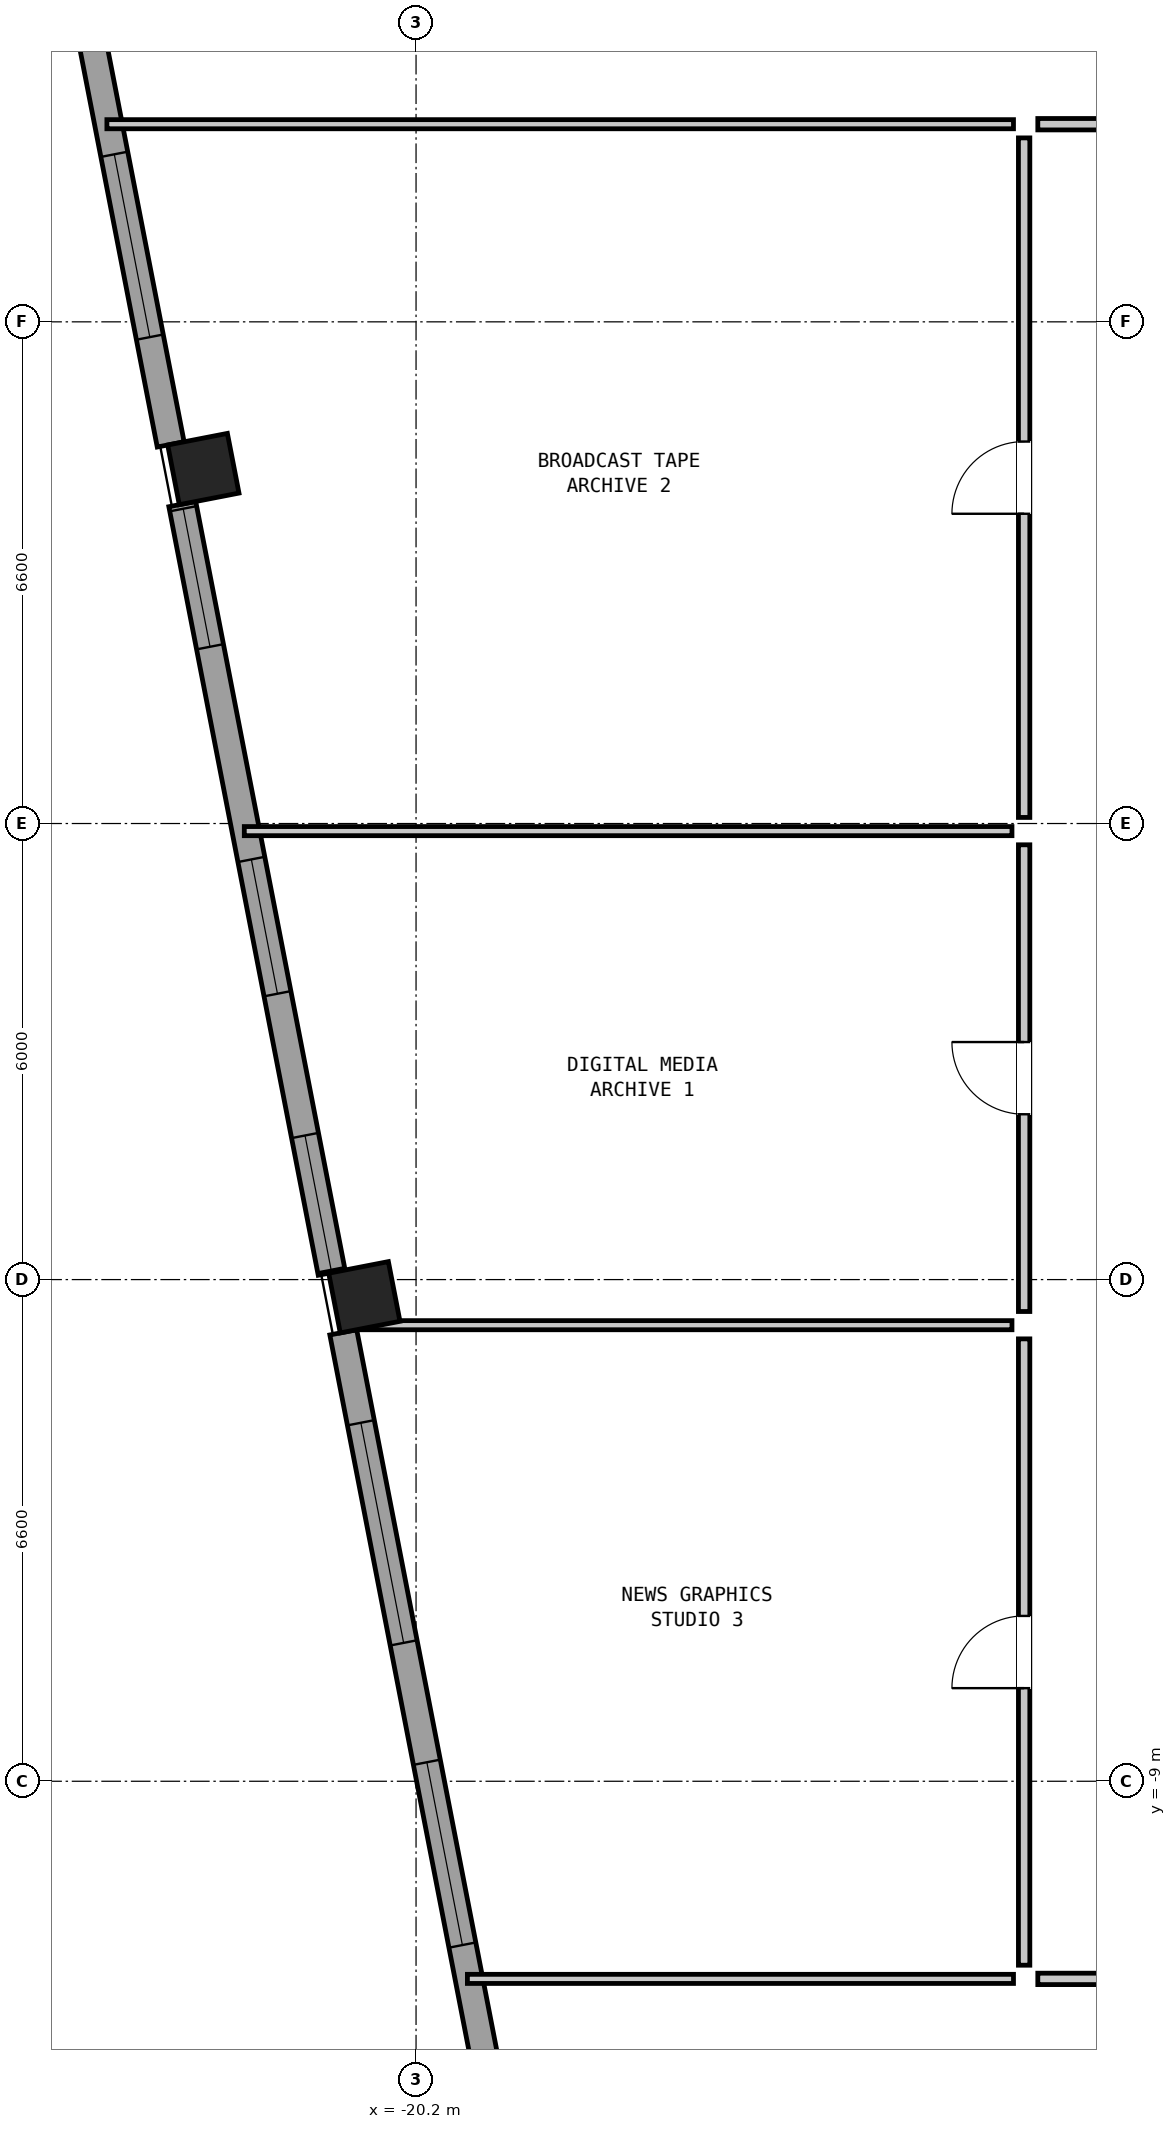
"""IFC4 building model, lengths in metres.
Left out: names, types, materials, properties, quantities, classifications, styles, units other than length and angle.
Written with IfcOpenShell. Run it as: python <this file> out.ifc"""

import sys

from ifc_helpers import new_model, si_unit, direction, frame, frame_2d, origin, origin_2d, place, context, subcontext, project, spatial, rectangle, hollow_rectangle, extrude, element, fill, save


model = new_model("IFC4")
c1 = context("Model", 3, precision=1e-05, world=origin(), true_north=direction((0.0, 1.0)))
c2 = subcontext(c1, "Body", "Model", "MODEL_VIEW")
j1 = project(units=[si_unit("LENGTHUNIT", "METRE"), si_unit("PLANEANGLEUNIT", "RADIAN")], contexts=[c1])
p1 = place(None, origin())
s1 = spatial("IfcSite", under=j1, at=p1, CompositionType="ELEMENT")
p2 = place(p1, origin())
s2 = spatial("IfcBuilding", under=s1, at=p2, CompositionType="ELEMENT")
p3 = place(p2, frame((0.0, 0.0, 134.15)))
s3 = spatial("IfcBuildingStorey", under=s2, at=p3, CompositionType="ELEMENT", Elevation=134.15)
for number, where, z_axis, x_axis in (
    (1, (-22.998, 8.263, 0.0), (0.0, 0.0, 1.0), (-0.191, 0.982, 0.0)),
    (2, (-20.88, -2.633, 0.0), (0.0, 0.0, 1.0), (-0.191, 0.982, 0.0)),
):
    element("IfcColumn", number, at=place(p3, frame(where, z_axis=z_axis, x_axis=x_axis)), inside=s3, PredefinedType="COLUMN", context=c2, shape_type="SweptSolid", body=[
        extrude(hollow_rectangle(XDim=0.8, YDim=0.8, WallThickness=0.05, at=origin_2d()), origin(), (0.0, 0.0, 1.0), 3.05),
    ])
p4 = place(p3, frame((-19.19, -13.217, 0.0), z_axis=(0.0, 0.0, 1.0), x_axis=(-0.190822765986, 0.981624506612, 0.0)))
e3 = element("IfcWall", 3, at=p4, inside=s3, PredefinedType="SOLIDWALL", context=c2, shape_type="SweptSolid", body=[
    extrude(rectangle(XDim=10.312, YDim=0.36, at=frame_2d((5.156, 0.0))), origin(), (0.0, 0.0, 1.0), 2.067),
])
p5 = place(p4, frame((2.1, 0.0, 0.2)))
e4 = element("IfcOpeningElement", 4, at=p5, cuts=e3, PredefinedType="OPENING", context=c2, shape_type="SweptSolid", body=[
    extrude(rectangle(XDim=2.45, YDim=1.1, at=frame_2d((1.225, 0.55))), frame((0.0, 0.192, 0.0), z_axis=(0.0, -1.0, 0.0), x_axis=(1.0, 0.0, 0.0)), (0.0, 0.0, 1.0), 0.384),
])
p6 = place(p4, frame((6.15, 0.0, 0.95)))
e5 = element("IfcOpeningElement", 5, at=p6, cuts=e3, PredefinedType="OPENING", context=c2, shape_type="SweptSolid", body=[
    extrude(rectangle(XDim=2.95, YDim=0.95, at=frame_2d((1.475, 0.475))), frame((0.0, 0.192, 0.0), z_axis=(0.0, -1.0, 0.0), x_axis=(1.0, 0.0, 0.0)), (0.0, 0.0, 1.0), 0.384),
])
p7 = place(p3, frame((-21.31, -2.309, 0.0), z_axis=(0.0, 0.0, 1.0), x_axis=(-0.190811924826, 0.981626614016, 0.0)))
e6 = element("IfcWall", 6, at=p7, inside=s3, PredefinedType="SOLIDWALL", context=c2, shape_type="SweptSolid", body=[
    extrude(rectangle(XDim=10.3, YDim=0.36, at=frame_2d((5.15, 0.0))), origin(), (0.0, 0.0, 1.0), 2.067),
])
p8 = place(p7, frame((0.038, 0.0, 0.2)))
e7 = element("IfcOpeningElement", 7, at=p8, cuts=e6, PredefinedType="OPENING", context=c2, shape_type="SweptSolid", body=[
    extrude(rectangle(XDim=1.8, YDim=1.25, at=frame_2d((0.9, 0.625))), frame((0.0, 0.192, 0.0), z_axis=(0.0, -1.0, 0.0), x_axis=(1.0, 0.0, 0.0)), (0.0, 0.0, 1.0), 0.384),
])
p9 = place(p7, frame((3.738, 0.0, 0.9)))
e8 = element("IfcOpeningElement", 8, at=p9, cuts=e6, PredefinedType="OPENING", context=c2, shape_type="SweptSolid", body=[
    extrude(rectangle(XDim=1.8, YDim=1.0, at=frame_2d((0.9, 0.5))), frame((0.0, 0.192, 0.0), z_axis=(0.0, -1.0, 0.0), x_axis=(1.0, 0.0, 0.0)), (0.0, 0.0, 1.0), 0.384),
])
p10 = place(p7, frame((8.388, 0.0, 0.2)))
e9 = element("IfcOpeningElement", 9, at=p10, cuts=e6, PredefinedType="OPENING", context=c2, shape_type="SweptSolid", body=[
    extrude(rectangle(XDim=1.85, YDim=1.2, at=frame_2d((0.925, 0.6))), frame((0.0, 0.192, 0.0), z_axis=(0.0, -1.0, 0.0), x_axis=(1.0, 0.0, 0.0)), (0.0, 0.0, 1.0), 0.384),
])
p11 = place(p3, frame((-23.428, 8.587, 0.0), z_axis=(0.0, 0.0, 1.0), x_axis=(-0.190822765986, 0.981624506612, 0.0)))
e10 = element("IfcWall", 10, at=p11, inside=s3, PredefinedType="SOLIDWALL", context=c2, shape_type="SweptSolid", body=[
    extrude(rectangle(XDim=10.312, YDim=0.36, at=frame_2d((5.156, 0.0))), origin(), (0.0, 0.0, 1.0), 2.067),
])
p12 = place(p11, frame((1.438, 0.0, 0.8)))
e11 = element("IfcOpeningElement", 11, at=p12, cuts=e10, PredefinedType="OPENING", context=c2, shape_type="SweptSolid", body=[
    extrude(rectangle(XDim=2.45, YDim=1.1, at=frame_2d((1.225, 0.55))), frame((0.0, 0.192, 0.0), z_axis=(0.0, -1.0, 0.0), x_axis=(1.0, 0.0, 0.0)), (0.0, 0.0, 1.0), 0.384),
])
p13 = place(p11, frame((5.438, 0.0, 0.2)))
e12 = element("IfcOpeningElement", 12, at=p13, cuts=e10, PredefinedType="OPENING", context=c2, shape_type="SweptSolid", body=[
    extrude(rectangle(XDim=3.1, YDim=0.9, at=frame_2d((1.55, 0.45))), frame((0.0, 0.192, 0.0), z_axis=(0.0, -1.0, 0.0), x_axis=(1.0, 0.0, 0.0)), (0.0, 0.0, 1.0), 0.384),
])
p14 = place(p3, frame((-24.267, 12.8, 0.0), z_axis=(0.0, 0.0, 1.0), x_axis=(1.0, 0.0, 0.0)))
e13 = element("IfcWall", 13, at=p14, inside=s3, PredefinedType="PARTITIONING", context=c2, shape_type="SweptSolid", body=[
    extrude(rectangle(XDim=11.927, YDim=0.12, at=frame_2d((5.964, 0.0))), origin(), (0.0, 0.0, 1.0), 2.83),
])
p15 = place(p3, frame((-19.524, -11.6, 0.0), z_axis=(0.0, 0.0, 1.0), x_axis=(1.0, 0.0, 0.0)))
e14 = element("IfcWall", 14, at=p15, inside=s3, PredefinedType="PARTITIONING", context=c2, shape_type="SweptSolid", body=[
    extrude(rectangle(XDim=7.184, YDim=0.12, at=frame_2d((3.592, 0.0))), origin(), (0.0, 0.0, 1.0), 2.347),
])
p16 = place(p3, frame((-21.196, -3.0, 0.0), z_axis=(0.0, 0.0, 1.0), x_axis=(1.0, 0.0, 0.0)))
e15 = element("IfcWall", 15, at=p16, inside=s3, PredefinedType="PARTITIONING", context=c2, shape_type="SweptSolid", body=[
    extrude(rectangle(XDim=8.836, YDim=0.12, at=frame_2d((4.418, 0.0))), origin(), (0.0, 0.0, 1.0), 1.883),
])
p17 = place(p3, frame((-22.459, 3.5, 0.0), z_axis=(0.0, 0.0, 1.0), x_axis=(1.0, 0.0, 0.0)))
e16 = element("IfcWall", 16, at=p17, inside=s3, PredefinedType="PARTITIONING", context=c2, shape_type="SweptSolid", body=[
    extrude(rectangle(XDim=10.099, YDim=0.12, at=frame_2d((5.05, 0.0))), origin(), (0.0, 0.0, 1.0), 1.883),
])
p18 = place(p3, frame((-12.02, 12.8, 0.0), z_axis=(0.0, 0.0, 1.0), x_axis=(1.0, 0.0, 0.0)))
e17 = element("IfcWall", 17, at=p18, inside=s3, PredefinedType="PARTITIONING", context=c2, shape_type="SweptSolid", body=[
    extrude(rectangle(XDim=5.34, YDim=0.15, at=frame_2d((2.67, 0.0))), origin(), (0.0, 0.0, 1.0), 2.83),
])
p19 = place(p18, frame((2.995, 0.0, 0.0)))
e18 = element("IfcOpeningElement", 18, at=p19, cuts=e17, PredefinedType="OPENING", context=c2, shape_type="SweptSolid", body=[
    extrude(rectangle(XDim=0.95, YDim=2.1, at=frame_2d((0.475, 1.05))), frame((0.0, 0.087, 0.0), z_axis=(0.0, -1.0, 0.0), x_axis=(1.0, 0.0, 0.0)), (0.0, 0.0, 1.0), 0.174),
])
p20 = place(p3, frame((-12.02, -11.6, 0.0), z_axis=(0.0, 0.0, 1.0), x_axis=(1.0, 0.0, 0.0)))
e19 = element("IfcWall", 19, at=p20, inside=s3, PredefinedType="PARTITIONING", context=c2, shape_type="SweptSolid", body=[
    extrude(rectangle(XDim=5.84, YDim=0.15, at=frame_2d((2.92, 0.0))), origin(), (0.0, 0.0, 1.0), 2.347),
])
p21 = place(p20, frame((3.045, 0.0, 0.0)))
e20 = element("IfcOpeningElement", 20, at=p21, cuts=e19, PredefinedType="OPENING", context=c2, shape_type="SweptSolid", body=[
    extrude(rectangle(XDim=0.95, YDim=2.1, at=frame_2d((0.475, 1.05))), frame((0.0, 0.087, 0.0), z_axis=(0.0, -1.0, 0.0), x_axis=(1.0, 0.0, 0.0)), (0.0, 0.0, 1.0), 0.174),
])
p22 = place(p3, frame((-12.2, -11.42, 0.0), z_axis=(0.0, 0.0, 1.0), x_axis=(0.0, 1.0, 0.0)))
e21 = element("IfcWall", 21, at=p22, inside=s3, PredefinedType="PARTITIONING", context=c2, shape_type="SweptSolid", body=[
    extrude(rectangle(XDim=8.24, YDim=0.15, at=frame_2d((4.12, 0.0))), origin(), (0.0, 0.0, 1.0), 2.83),
])
p23 = place(p22, frame((3.645, 0.0, 0.0)))
e22 = element("IfcOpeningElement", 22, at=p23, cuts=e21, PredefinedType="OPENING", context=c2, shape_type="SweptSolid", body=[
    extrude(rectangle(XDim=0.95, YDim=2.1, at=frame_2d((0.475, 1.05))), frame((0.0, 0.087, 0.0), z_axis=(0.0, -1.0, 0.0), x_axis=(1.0, 0.0, 0.0)), (0.0, 0.0, 1.0), 0.174),
])
p24 = place(p3, frame((-12.2, -2.82, 0.0), z_axis=(0.0, 0.0, 1.0), x_axis=(0.0, 1.0, 0.0)))
e23 = element("IfcWall", 23, at=p24, inside=s3, PredefinedType="PARTITIONING", context=c2, shape_type="SweptSolid", body=[
    extrude(rectangle(XDim=6.14, YDim=0.15, at=frame_2d((3.07, 0.0))), origin(), (0.0, 0.0, 1.0), 2.83),
])
p25 = place(p24, frame((2.595, 0.0, 0.0)))
e24 = element("IfcOpeningElement", 24, at=p25, cuts=e23, PredefinedType="OPENING", context=c2, shape_type="SweptSolid", body=[
    extrude(rectangle(XDim=0.95, YDim=2.1, at=frame_2d((0.475, 1.05))), frame((0.0, 0.087, 0.0), z_axis=(0.0, -1.0, 0.0), x_axis=(1.0, 0.0, 0.0)), (0.0, 0.0, 1.0), 0.174),
])
p26 = place(p3, frame((-12.2, 3.68, 0.0), z_axis=(0.0, 0.0, 1.0), x_axis=(0.0, 1.0, 0.0)))
e25 = element("IfcWall", 25, at=p26, inside=s3, PredefinedType="PARTITIONING", context=c2, shape_type="SweptSolid", body=[
    extrude(rectangle(XDim=8.94, YDim=0.15, at=frame_2d((4.47, 0.0))), origin(), (0.0, 0.0, 1.0), 2.83),
])
p27 = place(p26, frame((3.995, 0.0, 0.0)))
e26 = element("IfcOpeningElement", 26, at=p27, cuts=e25, PredefinedType="OPENING", context=c2, shape_type="SweptSolid", body=[
    extrude(rectangle(XDim=0.95, YDim=2.1, at=frame_2d((0.475, 1.05))), frame((0.0, 0.087, 0.0), z_axis=(0.0, -1.0, 0.0), x_axis=(1.0, 0.0, 0.0)), (0.0, 0.0, 1.0), 0.174),
])
p28 = place(p5, origin())
e27 = element("IfcWindow", 27, at=p28, inside=s3, PartitioningType="SINGLE_PANEL", PredefinedType="WINDOW", context=c2, shape_type="SweptSolid", body=[
    extrude(rectangle(XDim=2.45, YDim=1.1, at=frame_2d((1.225, 0.55))), frame((0.0, 0.03, 0.0), z_axis=(0.0, -1.0, 0.0), x_axis=(1.0, 0.0, 0.0)), (0.0, 0.0, 1.0), 0.06),
])
fill(e4, e27)
p29 = place(p6, origin())
e28 = element("IfcWindow", 28, at=p29, inside=s3, PartitioningType="SINGLE_PANEL", PredefinedType="WINDOW", context=c2, shape_type="SweptSolid", body=[
    extrude(rectangle(XDim=2.95, YDim=0.95, at=frame_2d((1.475, 0.475))), frame((0.0, 0.03, 0.0), z_axis=(0.0, -1.0, 0.0), x_axis=(1.0, 0.0, 0.0)), (0.0, 0.0, 1.0), 0.06),
])
fill(e5, e28)
p30 = place(p8, origin())
e29 = element("IfcWindow", 29, at=p30, inside=s3, PartitioningType="SINGLE_PANEL", PredefinedType="WINDOW", context=c2, shape_type="SweptSolid", body=[
    extrude(rectangle(XDim=1.8, YDim=1.25, at=frame_2d((0.9, 0.625))), frame((0.0, 0.03, 0.0), z_axis=(0.0, -1.0, 0.0), x_axis=(1.0, 0.0, 0.0)), (0.0, 0.0, 1.0), 0.06),
])
fill(e7, e29)
p31 = place(p9, origin())
e30 = element("IfcWindow", 30, at=p31, inside=s3, PartitioningType="SINGLE_PANEL", PredefinedType="WINDOW", context=c2, shape_type="SweptSolid", body=[
    extrude(rectangle(XDim=1.8, YDim=1.0, at=frame_2d((0.9, 0.5))), frame((0.0, 0.03, 0.0), z_axis=(0.0, -1.0, 0.0), x_axis=(1.0, 0.0, 0.0)), (0.0, 0.0, 1.0), 0.06),
])
fill(e8, e30)
p32 = place(p10, origin())
e31 = element("IfcWindow", 31, at=p32, inside=s3, PartitioningType="SINGLE_PANEL", PredefinedType="WINDOW", context=c2, shape_type="SweptSolid", body=[
    extrude(rectangle(XDim=1.85, YDim=1.2, at=frame_2d((0.925, 0.6))), frame((0.0, 0.03, 0.0), z_axis=(0.0, -1.0, 0.0), x_axis=(1.0, 0.0, 0.0)), (0.0, 0.0, 1.0), 0.06),
])
fill(e9, e31)
p33 = place(p12, origin())
e32 = element("IfcWindow", 32, at=p33, inside=s3, PartitioningType="SINGLE_PANEL", PredefinedType="WINDOW", context=c2, shape_type="SweptSolid", body=[
    extrude(rectangle(XDim=2.45, YDim=1.1, at=frame_2d((1.225, 0.55))), frame((0.0, 0.03, 0.0), z_axis=(0.0, -1.0, 0.0), x_axis=(1.0, 0.0, 0.0)), (0.0, 0.0, 1.0), 0.06),
])
fill(e11, e32)
p34 = place(p23, origin())
e33 = element("IfcDoor", 33, at=p34, inside=s3, OperationType="SINGLE_SWING_LEFT", PredefinedType="DOOR", context=c2, shape_type="SweptSolid", body=[
    extrude(rectangle(XDim=0.95, YDim=2.1, at=frame_2d((0.475, 1.05))), frame((0.0, 0.025, 0.0), z_axis=(0.0, -1.0, 0.0), x_axis=(1.0, 0.0, 0.0)), (0.0, 0.0, 1.0), 0.05),
])
fill(e22, e33)
p35 = place(p25, origin())
e34 = element("IfcDoor", 34, at=p35, inside=s3, OperationType="SINGLE_SWING_RIGHT", PredefinedType="DOOR", context=c2, shape_type="SweptSolid", body=[
    extrude(rectangle(XDim=0.95, YDim=2.1, at=frame_2d((0.475, 1.05))), frame((0.0, 0.025, 0.0), z_axis=(0.0, -1.0, 0.0), x_axis=(1.0, 0.0, 0.0)), (0.0, 0.0, 1.0), 0.05),
])
fill(e24, e34)
p36 = place(p27, origin())
e35 = element("IfcDoor", 35, at=p36, inside=s3, OperationType="SINGLE_SWING_LEFT", PredefinedType="DOOR", context=c2, shape_type="SweptSolid", body=[
    extrude(rectangle(XDim=0.95, YDim=2.1, at=frame_2d((0.475, 1.05))), frame((0.0, 0.025, 0.0), z_axis=(0.0, -1.0, 0.0), x_axis=(1.0, 0.0, 0.0)), (0.0, 0.0, 1.0), 0.05),
])
fill(e26, e35)
save(model, sys.argv[1])
